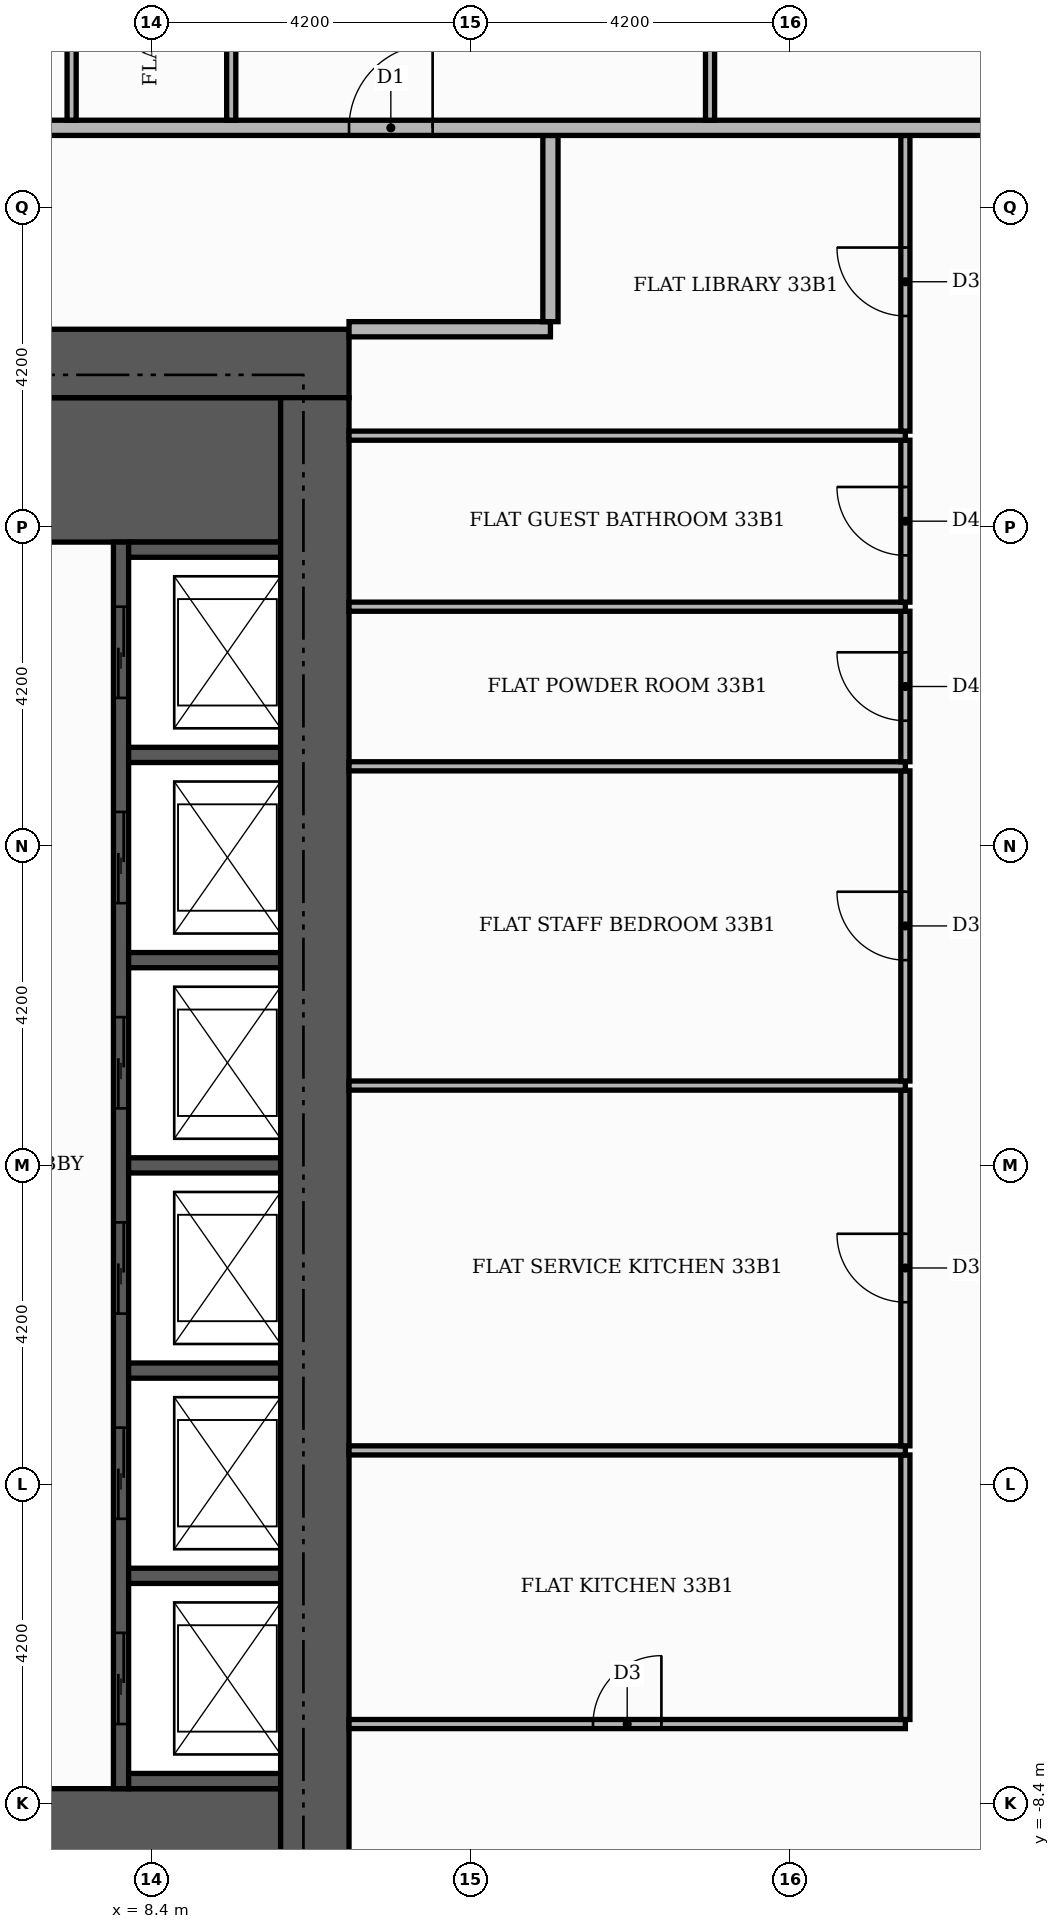
"""IFC4 building model, lengths in metres.
Left out: names, types, materials, properties, quantities, classifications, styles, units other than length and angle.
Written with IfcOpenShell. Run it as: python <this file> out.ifc"""

import sys

from ifc_helpers import new_model, si_unit, direction, frame, frame_2d, origin, place, context, subcontext, project, spatial, rectangle, extrude, element, fill, save


model = new_model("IFC4")
c1 = context("Model", 3, precision=1e-05, world=origin(), true_north=direction((0.0, 1.0)))
c2 = subcontext(c1, "Body", "Model", "MODEL_VIEW")
j1 = project(units=[si_unit("LENGTHUNIT", "METRE"), si_unit("PLANEANGLEUNIT", "RADIAN")], contexts=[c1])
p1 = place(None, origin())
s1 = spatial("IfcSite", under=j1, at=p1, CompositionType="ELEMENT")
p2 = place(p1, origin())
s2 = spatial("IfcBuilding", under=s1, at=p2, CompositionType="ELEMENT")
p3 = place(p2, frame((0.0, 0.0, 141.6)))
s3 = spatial("IfcBuildingStorey", under=s2, at=p3, CompositionType="ELEMENT", Elevation=141.6)
for number, where, z_axis, x_axis in (
    (1, (5.5, -9.15, 0.0), (0.0, 0.0, 1.0), (1.0, 0.0, 0.0)),
    (2, (5.5, 9.15, 0.0), (0.0, 0.0, 1.0), (1.0, 0.0, 0.0)),
):
    element("IfcWall", number, at=place(p3, frame(where, z_axis=z_axis, x_axis=x_axis)), inside=s3, PredefinedType="SHEAR", context=c2, shape_type="SweptSolid", body=[
        extrude(rectangle(XDim=4.6, YDim=1.9, at=frame_2d((2.3, 0.0))), origin(), (0.0, 0.0, 1.0), 3.48),
    ])
p4 = place(p3, frame((8.0, -8.2, 0.0), z_axis=(0.0, 0.0, 1.0), x_axis=(0.0, 1.0, 0.0)))
e3 = element("IfcWall", 3, at=p4, inside=s3, PredefinedType="SHEAR", context=c2, shape_type="SweptSolid", body=[
    extrude(rectangle(XDim=16.4, YDim=0.2, at=frame_2d((8.2, 0.0))), origin(), (0.0, 0.0, 1.0), 3.48),
])
p5 = place(p4, frame((0.85, 0.0, 0.0)))
e4 = element("IfcOpeningElement", 4, at=p5, cuts=e3, PredefinedType="OPENING", context=c2, shape_type="SweptSolid", body=[
    extrude(rectangle(XDim=1.2, YDim=2.1, at=frame_2d((0.6, 1.05))), frame((0.0, 0.11, 0.0), z_axis=(0.0, -1.0, 0.0), x_axis=(1.0, 0.0, 0.0)), (0.0, 0.0, 1.0), 0.22),
])
p6 = place(p4, frame((3.55, 0.0, 0.0)))
e5 = element("IfcOpeningElement", 5, at=p6, cuts=e3, PredefinedType="OPENING", context=c2, shape_type="SweptSolid", body=[
    extrude(rectangle(XDim=1.2, YDim=2.1, at=frame_2d((0.6, 1.05))), frame((0.0, 0.11, 0.0), z_axis=(0.0, -1.0, 0.0), x_axis=(1.0, 0.0, 0.0)), (0.0, 0.0, 1.0), 0.22),
])
p7 = place(p4, frame((6.25, 0.0, 0.0)))
e6 = element("IfcOpeningElement", 6, at=p7, cuts=e3, PredefinedType="OPENING", context=c2, shape_type="SweptSolid", body=[
    extrude(rectangle(XDim=1.2, YDim=2.1, at=frame_2d((0.6, 1.05))), frame((0.0, 0.11, 0.0), z_axis=(0.0, -1.0, 0.0), x_axis=(1.0, 0.0, 0.0)), (0.0, 0.0, 1.0), 0.22),
])
p8 = place(p4, frame((8.95, 0.0, 0.0)))
e7 = element("IfcOpeningElement", 7, at=p8, cuts=e3, PredefinedType="OPENING", context=c2, shape_type="SweptSolid", body=[
    extrude(rectangle(XDim=1.2, YDim=2.1, at=frame_2d((0.6, 1.05))), frame((0.0, 0.11, 0.0), z_axis=(0.0, -1.0, 0.0), x_axis=(1.0, 0.0, 0.0)), (0.0, 0.0, 1.0), 0.22),
])
p9 = place(p4, frame((11.65, 0.0, 0.0)))
e8 = element("IfcOpeningElement", 8, at=p9, cuts=e3, PredefinedType="OPENING", context=c2, shape_type="SweptSolid", body=[
    extrude(rectangle(XDim=1.2, YDim=2.1, at=frame_2d((0.6, 1.05))), frame((0.0, 0.11, 0.0), z_axis=(0.0, -1.0, 0.0), x_axis=(1.0, 0.0, 0.0)), (0.0, 0.0, 1.0), 0.22),
])
p10 = place(p4, frame((14.35, 0.0, 0.0)))
e9 = element("IfcOpeningElement", 9, at=p10, cuts=e3, PredefinedType="OPENING", context=c2, shape_type="SweptSolid", body=[
    extrude(rectangle(XDim=1.2, YDim=2.1, at=frame_2d((0.6, 1.05))), frame((0.0, 0.11, 0.0), z_axis=(0.0, -1.0, 0.0), x_axis=(1.0, 0.0, 0.0)), (0.0, 0.0, 1.0), 0.22),
])
for number, where, z_axis, x_axis in (
    (10, (8.1, -8.1, 0.0), (0.0, 0.0, 1.0), (1.0, 0.0, 0.0)),
    (11, (8.1, -5.4, 0.0), (0.0, 0.0, 1.0), (1.0, 0.0, 0.0)),
    (12, (8.1, -2.7, 0.0), (0.0, 0.0, 1.0), (1.0, 0.0, 0.0)),
    (13, (8.1, 0.0, 0.0), (0.0, 0.0, 1.0), (1.0, 0.0, 0.0)),
    (14, (8.1, 2.7, 0.0), (0.0, 0.0, 1.0), (1.0, 0.0, 0.0)),
    (15, (8.1, 5.4, 0.0), (0.0, 0.0, 1.0), (1.0, 0.0, 0.0)),
    (16, (8.1, 8.1, 0.0), (0.0, 0.0, 1.0), (1.0, 0.0, 0.0)),
):
    element("IfcWall", number, at=place(p3, frame(where, z_axis=z_axis, x_axis=x_axis)), inside=s3, PredefinedType="SHEAR", context=c2, shape_type="SweptSolid", body=[
        extrude(rectangle(XDim=2.0, YDim=0.2, at=frame_2d((1.0, 0.0))), origin(), (0.0, 0.0, 1.0), 3.48),
    ])
p11 = place(p3, frame((-11.0, 10.55, 0.0), z_axis=(0.0, 0.0, 1.0), x_axis=(1.0, 0.0, 0.0)))
e17 = element("IfcWall", 17, at=p11, inside=s3, PredefinedType="SHEAR", context=c2, shape_type="SweptSolid", body=[
    extrude(rectangle(XDim=22.0, YDim=0.9, at=frame_2d((11.0, 0.0))), origin(), (0.0, 0.0, 1.0), 3.48),
])
p12 = place(p11, frame((13.3, 0.0, 0.0)))
e18 = element("IfcOpeningElement", 18, at=p12, cuts=e17, PredefinedType="OPENING", context=c2, shape_type="SweptSolid", body=[
    extrude(rectangle(XDim=1.8, YDim=2.2, at=frame_2d((0.9, 1.1))), frame((0.0, 0.46, 0.0), z_axis=(0.0, -1.0, 0.0), x_axis=(1.0, 0.0, 0.0)), (0.0, 0.0, 1.0), 0.92),
])
p13 = place(p3, frame((10.55, -10.1, 0.0), z_axis=(0.0, 0.0, 1.0), x_axis=(0.0, 1.0, 0.0)))
e19 = element("IfcWall", 19, at=p13, inside=s3, PredefinedType="SHEAR", context=c2, shape_type="SweptSolid", body=[
    extrude(rectangle(XDim=20.2, YDim=0.9, at=frame_2d((10.1, 0.0))), origin(), (0.0, 0.0, 1.0), 3.48),
])
p14 = place(p3, frame((11.0, -7.35, 0.0), z_axis=(0.0, 0.0, 1.0), x_axis=(1.0, 0.0, 0.0)))
e20 = element("IfcWall", 20, at=p14, inside=s3, PredefinedType="PARTITIONING", context=c2, shape_type="SweptSolid", body=[
    extrude(rectangle(XDim=7.32, YDim=0.12, at=frame_2d((3.66, 0.0))), origin(), (0.0, 0.0, 1.0), 3.48),
])
p15 = place(p14, frame((3.21, 0.0, 0.0)))
e21 = element("IfcOpeningElement", 21, at=p15, cuts=e20, PredefinedType="OPENING", context=c2, shape_type="SweptSolid", body=[
    extrude(rectangle(XDim=0.9, YDim=2.1, at=frame_2d((0.45, 1.05))), frame((0.0, 0.07, 0.0), z_axis=(0.0, -1.0, 0.0), x_axis=(1.0, 0.0, 0.0)), (0.0, 0.0, 1.0), 0.14),
])
p16 = place(p3, frame((18.32, -7.29, 0.0), z_axis=(0.0, 0.0, 1.0), x_axis=(0.0, 1.0, 0.0)))
e22 = element("IfcWall", 22, at=p16, inside=s3, PredefinedType="PARTITIONING", context=c2, shape_type="SweptSolid", body=[
    extrude(rectangle(XDim=3.48, YDim=0.12, at=frame_2d((1.74, 0.0))), origin(), (0.0, 0.0, 1.0), 3.48),
])
p17 = place(p3, frame((11.0, -3.75, 0.0), z_axis=(0.0, 0.0, 1.0), x_axis=(1.0, 0.0, 0.0)))
e23 = element("IfcWall", 23, at=p17, inside=s3, PredefinedType="PARTITIONING", context=c2, shape_type="SweptSolid", body=[
    extrude(rectangle(XDim=7.32, YDim=0.12, at=frame_2d((3.66, 0.0))), origin(), (0.0, 0.0, 1.0), 3.48),
])
p18 = place(p3, frame((18.32, -3.69, 0.0), z_axis=(0.0, 0.0, 1.0), x_axis=(0.0, 1.0, 0.0)))
e24 = element("IfcWall", 24, at=p18, inside=s3, PredefinedType="PARTITIONING", context=c2, shape_type="SweptSolid", body=[
    extrude(rectangle(XDim=4.68, YDim=0.12, at=frame_2d((2.34, 0.0))), origin(), (0.0, 0.0, 1.0), 3.48),
])
p19 = place(p18, frame((1.89, 0.0, 0.0)))
e25 = element("IfcOpeningElement", 25, at=p19, cuts=e24, PredefinedType="OPENING", context=c2, shape_type="SweptSolid", body=[
    extrude(rectangle(XDim=0.9, YDim=2.1, at=frame_2d((0.45, 1.05))), frame((0.0, 0.07, 0.0), z_axis=(0.0, -1.0, 0.0), x_axis=(1.0, 0.0, 0.0)), (0.0, 0.0, 1.0), 0.14),
])
p20 = place(p3, frame((11.0, 1.05, 0.0), z_axis=(0.0, 0.0, 1.0), x_axis=(1.0, 0.0, 0.0)))
e26 = element("IfcWall", 26, at=p20, inside=s3, PredefinedType="PARTITIONING", context=c2, shape_type="SweptSolid", body=[
    extrude(rectangle(XDim=7.32, YDim=0.12, at=frame_2d((3.66, 0.0))), origin(), (0.0, 0.0, 1.0), 3.48),
])
p21 = place(p3, frame((18.32, 1.11, 0.0), z_axis=(0.0, 0.0, 1.0), x_axis=(0.0, 1.0, 0.0)))
e27 = element("IfcWall", 27, at=p21, inside=s3, PredefinedType="PARTITIONING", context=c2, shape_type="SweptSolid", body=[
    extrude(rectangle(XDim=4.08, YDim=0.12, at=frame_2d((2.04, 0.0))), origin(), (0.0, 0.0, 1.0), 3.48),
])
p22 = place(p21, frame((1.59, 0.0, 0.0)))
e28 = element("IfcOpeningElement", 28, at=p22, cuts=e27, PredefinedType="OPENING", context=c2, shape_type="SweptSolid", body=[
    extrude(rectangle(XDim=0.9, YDim=2.1, at=frame_2d((0.45, 1.05))), frame((0.0, 0.07, 0.0), z_axis=(0.0, -1.0, 0.0), x_axis=(1.0, 0.0, 0.0)), (0.0, 0.0, 1.0), 0.14),
])
p23 = place(p3, frame((11.0, 5.25, 0.0), z_axis=(0.0, 0.0, 1.0), x_axis=(1.0, 0.0, 0.0)))
e29 = element("IfcWall", 29, at=p23, inside=s3, PredefinedType="PARTITIONING", context=c2, shape_type="SweptSolid", body=[
    extrude(rectangle(XDim=7.32, YDim=0.12, at=frame_2d((3.66, 0.0))), origin(), (0.0, 0.0, 1.0), 3.48),
])
p24 = place(p3, frame((18.32, 5.31, 0.0), z_axis=(0.0, 0.0, 1.0), x_axis=(0.0, 1.0, 0.0)))
e30 = element("IfcWall", 30, at=p24, inside=s3, PredefinedType="PARTITIONING", context=c2, shape_type="SweptSolid", body=[
    extrude(rectangle(XDim=1.98, YDim=0.12, at=frame_2d((0.99, 0.0))), origin(), (0.0, 0.0, 1.0), 3.48),
])
p25 = place(p24, frame((0.54, 0.0, 0.0)))
e31 = element("IfcOpeningElement", 31, at=p25, cuts=e30, PredefinedType="OPENING", context=c2, shape_type="SweptSolid", body=[
    extrude(rectangle(XDim=0.9, YDim=2.1, at=frame_2d((0.45, 1.05))), frame((0.0, 0.07, 0.0), z_axis=(0.0, -1.0, 0.0), x_axis=(1.0, 0.0, 0.0)), (0.0, 0.0, 1.0), 0.14),
])
p26 = place(p3, frame((11.0, 7.35, 0.0), z_axis=(0.0, 0.0, 1.0), x_axis=(1.0, 0.0, 0.0)))
e32 = element("IfcWall", 32, at=p26, inside=s3, PredefinedType="PARTITIONING", context=c2, shape_type="SweptSolid", body=[
    extrude(rectangle(XDim=7.32, YDim=0.12, at=frame_2d((3.66, 0.0))), origin(), (0.0, 0.0, 1.0), 3.48),
])
p27 = place(p3, frame((18.32, 7.41, 0.0), z_axis=(0.0, 0.0, 1.0), x_axis=(0.0, 1.0, 0.0)))
e33 = element("IfcWall", 33, at=p27, inside=s3, PredefinedType="PARTITIONING", context=c2, shape_type="SweptSolid", body=[
    extrude(rectangle(XDim=2.13, YDim=0.12, at=frame_2d((1.065, 0.0))), origin(), (0.0, 0.0, 1.0), 3.48),
])
p28 = place(p27, frame((0.615, 0.0, 0.0)))
e34 = element("IfcOpeningElement", 34, at=p28, cuts=e33, PredefinedType="OPENING", context=c2, shape_type="SweptSolid", body=[
    extrude(rectangle(XDim=0.9, YDim=2.1, at=frame_2d((0.45, 1.05))), frame((0.0, 0.07, 0.0), z_axis=(0.0, -1.0, 0.0), x_axis=(1.0, 0.0, 0.0)), (0.0, 0.0, 1.0), 0.14),
])
p29 = place(p3, frame((11.0, 9.6, 0.0), z_axis=(0.0, 0.0, 1.0), x_axis=(1.0, 0.0, 0.0)))
e35 = element("IfcWall", 35, at=p29, inside=s3, PredefinedType="PARTITIONING", context=c2, shape_type="SweptSolid", body=[
    extrude(rectangle(XDim=7.32, YDim=0.12, at=frame_2d((3.66, 0.0))), origin(), (0.0, 0.0, 1.0), 3.48),
])
p30 = place(p3, frame((18.32, 9.66, 0.0), z_axis=(0.0, 0.0, 1.0), x_axis=(0.0, 1.0, 0.0)))
e36 = element("IfcWall", 36, at=p30, inside=s3, PredefinedType="PARTITIONING", context=c2, shape_type="SweptSolid", body=[
    extrude(rectangle(XDim=3.89, YDim=0.12, at=frame_2d((1.945, 0.0))), origin(), (0.0, 0.0, 1.0), 3.48),
])
p31 = place(p30, frame((1.515, 0.0, 0.0)))
e37 = element("IfcOpeningElement", 37, at=p31, cuts=e36, PredefinedType="OPENING", context=c2, shape_type="SweptSolid", body=[
    extrude(rectangle(XDim=0.9, YDim=2.1, at=frame_2d((0.45, 1.05))), frame((0.0, 0.07, 0.0), z_axis=(0.0, -1.0, 0.0), x_axis=(1.0, 0.0, 0.0)), (0.0, 0.0, 1.0), 0.14),
])
p32 = place(p3, frame((11.0, 11.0, 0.0), z_axis=(0.0, 0.0, 1.0), x_axis=(1.0, 0.0, 0.0)))
e38 = element("IfcWall", 38, at=p32, inside=s3, PredefinedType="PARTITIONING", context=c2, shape_type="SweptSolid", body=[
    extrude(rectangle(XDim=2.65, YDim=0.2, at=frame_2d((1.325, 0.0))), origin(), (0.0, 0.0, 1.0), 3.48),
])
p33 = place(p3, frame((13.65, 11.1, 0.0), z_axis=(0.0, 0.0, 1.0), x_axis=(0.0, 1.0, 0.0)))
e39 = element("IfcWall", 39, at=p33, inside=s3, PredefinedType="PARTITIONING", context=c2, shape_type="SweptSolid", body=[
    extrude(rectangle(XDim=2.45, YDim=0.2, at=frame_2d((1.225, 0.0))), origin(), (0.0, 0.0, 1.0), 3.48),
])
p34 = place(p3, frame((-13.65, 13.65, 0.0), z_axis=(0.0, 0.0, 1.0), x_axis=(1.0, 0.0, 0.0)))
e40 = element("IfcWall", 40, at=p34, inside=s3, PredefinedType="PARTITIONING", context=c2, shape_type="SweptSolid", body=[
    extrude(rectangle(XDim=39.07, YDim=0.2, at=frame_2d((19.535, 0.0))), origin(), (0.0, 0.0, 1.0), 3.48),
])
p35 = place(p34, frame((24.65, 0.0, 0.0)))
e41 = element("IfcOpeningElement", 41, at=p35, cuts=e40, PredefinedType="OPENING", context=c2, shape_type="SweptSolid", body=[
    extrude(rectangle(XDim=1.1, YDim=2.4, at=frame_2d((0.55, 1.2))), frame((0.0, 0.11, 0.0), z_axis=(0.0, -1.0, 0.0), x_axis=(1.0, 0.0, 0.0)), (0.0, 0.0, 1.0), 0.22),
])
p36 = place(p34, frame((12.05, 0.0, 0.0)))
e42 = element("IfcOpeningElement", 42, at=p36, cuts=e40, PredefinedType="OPENING", context=c2, shape_type="SweptSolid", body=[
    extrude(rectangle(XDim=1.1, YDim=2.4, at=frame_2d((0.55, 1.2))), frame((0.0, 0.11, 0.0), z_axis=(0.0, -1.0, 0.0), x_axis=(1.0, 0.0, 0.0)), (0.0, 0.0, 1.0), 0.22),
])
p37 = place(p3, frame((7.35, 13.75, 0.0), z_axis=(0.0, 0.0, 1.0), x_axis=(0.0, 1.0, 0.0)))
e43 = element("IfcWall", 43, at=p37, inside=s3, PredefinedType="PARTITIONING", context=c2, shape_type="SweptSolid", body=[
    extrude(rectangle(XDim=5.11, YDim=0.12, at=frame_2d((2.555, 0.0))), origin(), (0.0, 0.0, 1.0), 3.48),
])
p38 = place(p3, frame((9.45, 13.75, 0.0), z_axis=(0.0, 0.0, 1.0), x_axis=(0.0, 1.0, 0.0)))
e44 = element("IfcWall", 44, at=p38, inside=s3, PredefinedType="PARTITIONING", context=c2, shape_type="SweptSolid", body=[
    extrude(rectangle(XDim=5.11, YDim=0.12, at=frame_2d((2.555, 0.0))), origin(), (0.0, 0.0, 1.0), 3.48),
])
p39 = place(p38, frame((2.085, 0.0, 0.0)))
e45 = element("IfcOpeningElement", 45, at=p39, cuts=e44, PredefinedType="OPENING", context=c2, shape_type="SweptSolid", body=[
    extrude(rectangle(XDim=0.9, YDim=2.1, at=frame_2d((0.45, 1.05))), frame((0.0, 0.07, 0.0), z_axis=(0.0, -1.0, 0.0), x_axis=(1.0, 0.0, 0.0)), (0.0, 0.0, 1.0), 0.14),
])
p40 = place(p3, frame((15.75, 13.75, 0.0), z_axis=(0.0, 0.0, 1.0), x_axis=(0.0, 1.0, 0.0)))
e46 = element("IfcWall", 46, at=p40, inside=s3, PredefinedType="PARTITIONING", context=c2, shape_type="SweptSolid", body=[
    extrude(rectangle(XDim=6.61, YDim=0.12, at=frame_2d((3.305, 0.0))), origin(), (0.0, 0.0, 1.0), 3.48),
])
p41 = place(p40, frame((2.785, 0.0, 0.0)))
e47 = element("IfcOpeningElement", 47, at=p41, cuts=e46, PredefinedType="OPENING", context=c2, shape_type="SweptSolid", body=[
    extrude(rectangle(XDim=1.0, YDim=2.1, at=frame_2d((0.5, 1.05))), frame((0.0, 0.07, 0.0), z_axis=(0.0, -1.0, 0.0), x_axis=(1.0, 0.0, 0.0)), (0.0, 0.0, 1.0), 0.14),
])
p42 = place(p5, origin())
e48 = element("IfcDoor", 48, at=p42, inside=s3, OperationType="SLIDING_TO_LEFT", PredefinedType="DOOR", context=c2, shape_type="SweptSolid", body=[
    extrude(rectangle(XDim=1.2, YDim=2.1, at=frame_2d((0.6, 1.05))), frame((0.0, 0.025, 0.0), z_axis=(0.0, -1.0, 0.0), x_axis=(1.0, 0.0, 0.0)), (0.0, 0.0, 1.0), 0.05),
])
fill(e4, e48)
p43 = place(p6, origin())
e49 = element("IfcDoor", 49, at=p43, inside=s3, OperationType="SLIDING_TO_LEFT", PredefinedType="DOOR", context=c2, shape_type="SweptSolid", body=[
    extrude(rectangle(XDim=1.2, YDim=2.1, at=frame_2d((0.6, 1.05))), frame((0.0, 0.025, 0.0), z_axis=(0.0, -1.0, 0.0), x_axis=(1.0, 0.0, 0.0)), (0.0, 0.0, 1.0), 0.05),
])
fill(e5, e49)
p44 = place(p7, origin())
e50 = element("IfcDoor", 50, at=p44, inside=s3, OperationType="SLIDING_TO_LEFT", PredefinedType="DOOR", context=c2, shape_type="SweptSolid", body=[
    extrude(rectangle(XDim=1.2, YDim=2.1, at=frame_2d((0.6, 1.05))), frame((0.0, 0.025, 0.0), z_axis=(0.0, -1.0, 0.0), x_axis=(1.0, 0.0, 0.0)), (0.0, 0.0, 1.0), 0.05),
])
fill(e6, e50)
p45 = place(p8, origin())
e51 = element("IfcDoor", 51, at=p45, inside=s3, OperationType="SLIDING_TO_LEFT", PredefinedType="DOOR", context=c2, shape_type="SweptSolid", body=[
    extrude(rectangle(XDim=1.2, YDim=2.1, at=frame_2d((0.6, 1.05))), frame((0.0, 0.025, 0.0), z_axis=(0.0, -1.0, 0.0), x_axis=(1.0, 0.0, 0.0)), (0.0, 0.0, 1.0), 0.05),
])
fill(e7, e51)
p46 = place(p9, origin())
e52 = element("IfcDoor", 52, at=p46, inside=s3, OperationType="SLIDING_TO_LEFT", PredefinedType="DOOR", context=c2, shape_type="SweptSolid", body=[
    extrude(rectangle(XDim=1.2, YDim=2.1, at=frame_2d((0.6, 1.05))), frame((0.0, 0.025, 0.0), z_axis=(0.0, -1.0, 0.0), x_axis=(1.0, 0.0, 0.0)), (0.0, 0.0, 1.0), 0.05),
])
fill(e8, e52)
p47 = place(p10, origin())
e53 = element("IfcDoor", 53, at=p47, inside=s3, OperationType="SLIDING_TO_LEFT", PredefinedType="DOOR", context=c2, shape_type="SweptSolid", body=[
    extrude(rectangle(XDim=1.2, YDim=2.1, at=frame_2d((0.6, 1.05))), frame((0.0, 0.025, 0.0), z_axis=(0.0, -1.0, 0.0), x_axis=(1.0, 0.0, 0.0)), (0.0, 0.0, 1.0), 0.05),
])
fill(e9, e53)
p48 = place(p15, origin())
e54 = element("IfcDoor", 54, at=p48, inside=s3, OperationType="SINGLE_SWING_RIGHT", PredefinedType="DOOR", context=c2, shape_type="SweptSolid", body=[
    extrude(rectangle(XDim=0.9, YDim=2.1, at=frame_2d((0.45, 1.05))), frame((0.0, 0.025, 0.0), z_axis=(0.0, -1.0, 0.0), x_axis=(1.0, 0.0, 0.0)), (0.0, 0.0, 1.0), 0.05),
])
fill(e21, e54)
p49 = place(p19, origin())
e55 = element("IfcDoor", 55, at=p49, inside=s3, OperationType="SINGLE_SWING_RIGHT", PredefinedType="DOOR", context=c2, shape_type="SweptSolid", body=[
    extrude(rectangle(XDim=0.9, YDim=2.1, at=frame_2d((0.45, 1.05))), frame((0.0, 0.025, 0.0), z_axis=(0.0, -1.0, 0.0), x_axis=(1.0, 0.0, 0.0)), (0.0, 0.0, 1.0), 0.05),
])
fill(e25, e55)
p50 = place(p22, origin())
e56 = element("IfcDoor", 56, at=p50, inside=s3, OperationType="SINGLE_SWING_RIGHT", PredefinedType="DOOR", context=c2, shape_type="SweptSolid", body=[
    extrude(rectangle(XDim=0.9, YDim=2.1, at=frame_2d((0.45, 1.05))), frame((0.0, 0.025, 0.0), z_axis=(0.0, -1.0, 0.0), x_axis=(1.0, 0.0, 0.0)), (0.0, 0.0, 1.0), 0.05),
])
fill(e28, e56)
p51 = place(p25, origin())
e57 = element("IfcDoor", 57, at=p51, inside=s3, OperationType="SINGLE_SWING_RIGHT", PredefinedType="DOOR", context=c2, shape_type="SweptSolid", body=[
    extrude(rectangle(XDim=0.9, YDim=2.1, at=frame_2d((0.45, 1.05))), frame((0.0, 0.025, 0.0), z_axis=(0.0, -1.0, 0.0), x_axis=(1.0, 0.0, 0.0)), (0.0, 0.0, 1.0), 0.05),
])
fill(e31, e57)
p52 = place(p28, origin())
e58 = element("IfcDoor", 58, at=p52, inside=s3, OperationType="SINGLE_SWING_RIGHT", PredefinedType="DOOR", context=c2, shape_type="SweptSolid", body=[
    extrude(rectangle(XDim=0.9, YDim=2.1, at=frame_2d((0.45, 1.05))), frame((0.0, 0.025, 0.0), z_axis=(0.0, -1.0, 0.0), x_axis=(1.0, 0.0, 0.0)), (0.0, 0.0, 1.0), 0.05),
])
fill(e34, e58)
p53 = place(p31, origin())
e59 = element("IfcDoor", 59, at=p53, inside=s3, OperationType="SINGLE_SWING_RIGHT", PredefinedType="DOOR", context=c2, shape_type="SweptSolid", body=[
    extrude(rectangle(XDim=0.9, YDim=2.1, at=frame_2d((0.45, 1.05))), frame((0.0, 0.025, 0.0), z_axis=(0.0, -1.0, 0.0), x_axis=(1.0, 0.0, 0.0)), (0.0, 0.0, 1.0), 0.05),
])
fill(e37, e59)
p54 = place(p35, origin())
e60 = element("IfcDoor", 60, at=p54, inside=s3, OperationType="SINGLE_SWING_RIGHT", PredefinedType="DOOR", context=c2, shape_type="SweptSolid", body=[
    extrude(rectangle(XDim=1.1, YDim=2.4, at=frame_2d((0.55, 1.2))), frame((0.0, 0.025, 0.0), z_axis=(0.0, -1.0, 0.0), x_axis=(1.0, 0.0, 0.0)), (0.0, 0.0, 1.0), 0.05),
])
fill(e41, e60)
save(model, sys.argv[1])
